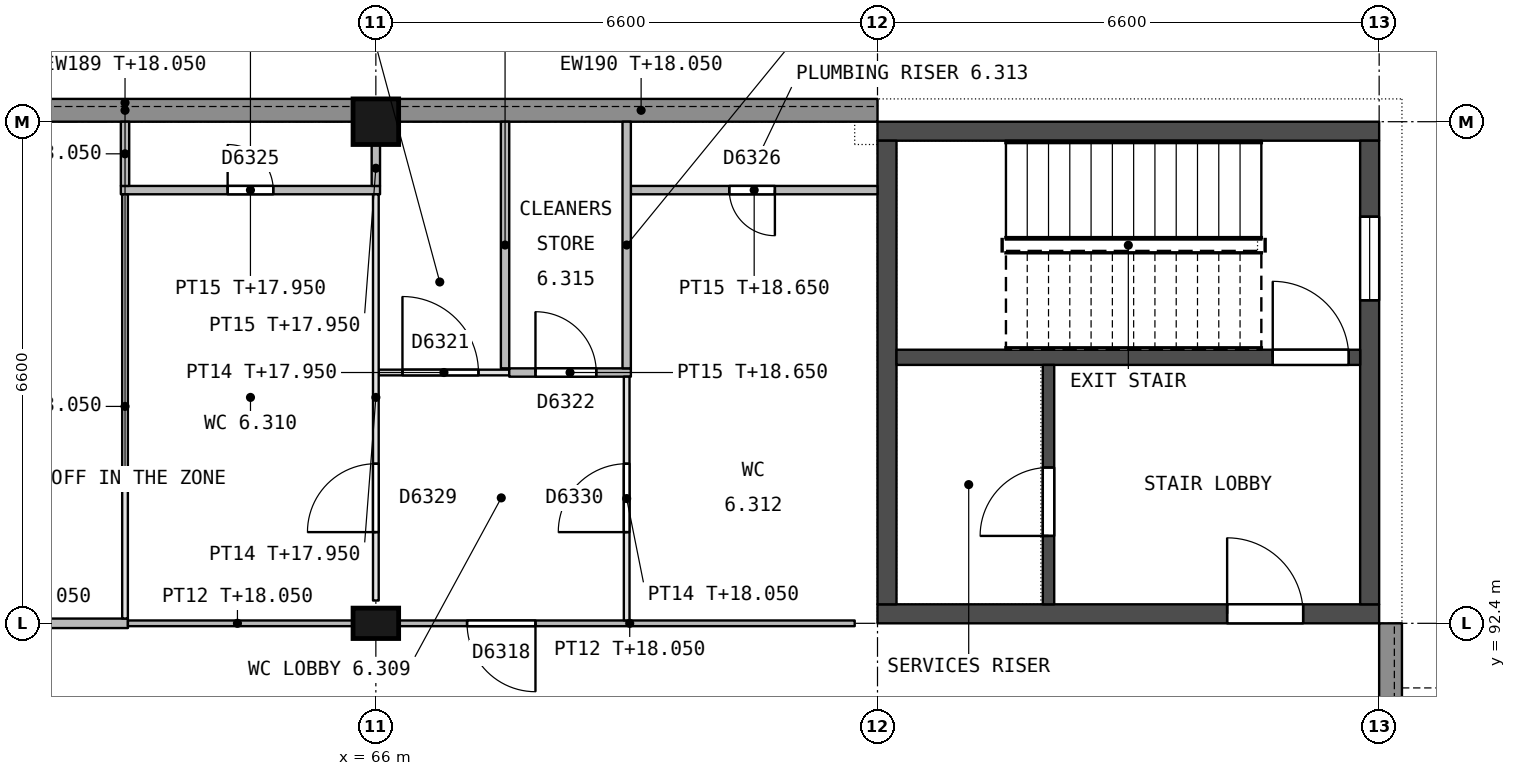
"""IFC4 building model, lengths in metres.
Left out: names, types, materials, properties, quantities, classifications, styles, units other than length and angle.
Written with IfcOpenShell. Run it as: python <this file> out.ifc"""

import sys

from ifc_helpers import new_model, si_unit, direction, frame, frame_2d, origin, origin_2d, place, context, subcontext, project, spatial, rectangle, extrude, element, fill, save


model = new_model("IFC4")
c1 = context("Model", 3, precision=1e-05, world=origin(), true_north=direction((0.0, 1.0)))
c2 = subcontext(c1, "Body", "Model", "MODEL_VIEW")
j1 = project(units=[si_unit("LENGTHUNIT", "METRE"), si_unit("PLANEANGLEUNIT", "RADIAN")], contexts=[c1])
p1 = place(None, origin())
s1 = spatial("IfcSite", under=j1, at=p1, CompositionType="ELEMENT")
p2 = place(p1, origin())
s2 = spatial("IfcBuilding", under=s1, at=p2, CompositionType="ELEMENT")
p3 = place(p2, frame((0.0, 0.0, 14.4)))
s3 = spatial("IfcBuildingStorey", under=s2, at=p3, CompositionType="ELEMENT", Elevation=14.4)
p4 = place(p3, frame((66.0, 92.4, 0.0), z_axis=(0.0, 0.0, 1.0), x_axis=(1.0, 0.0, 0.0)))
e1 = element("IfcColumn", 1, at=p4, inside=s3, PredefinedType="COLUMN", context=c2, shape_type="SweptSolid", body=[
    extrude(rectangle(XDim=0.6, YDim=0.4, at=origin_2d()), origin(), (0.0, 0.0, 1.0), 4.5),
])
p5 = place(p3, frame((66.0, 99.0, 0.0), z_axis=(0.0, 0.0, 1.0), x_axis=(1.0, 0.0, 0.0)))
e2 = element("IfcColumn", 2, at=p5, inside=s3, PredefinedType="COLUMN", context=c2, shape_type="SweptSolid", body=[
    extrude(rectangle(XDim=0.6, YDim=0.6, at=origin_2d()), origin(), (0.0, 0.0, 1.0), 4.5),
])
p6 = place(p3, frame((72.6, 92.525, 0.0), z_axis=(0.0, 0.0, 1.0), x_axis=(1.0, 0.0, 0.0)))
e3 = element("IfcWall", 3, at=p6, inside=s3, PredefinedType="SHEAR", context=c2, shape_type="SweptSolid", body=[
    extrude(rectangle(XDim=6.6, YDim=0.25, at=frame_2d((3.3, 0.0))), origin(), (0.0, 0.0, 1.0), 4.25),
])
p7 = place(p6, frame((4.6, 0.0, 0.0)))
e4 = element("IfcOpeningElement", 4, at=p7, cuts=e3, PredefinedType="OPENING", context=c2, shape_type="SweptSolid", body=[
    extrude(rectangle(XDim=1.0, YDim=2.1, at=frame_2d((0.5, 1.05))), frame((0.0, 0.135, 0.0), z_axis=(0.0, -1.0, 0.0), x_axis=(1.0, 0.0, 0.0)), (0.0, 0.0, 1.0), 0.27),
])
p8 = place(p3, frame((72.6, 98.875, 0.0), z_axis=(0.0, 0.0, 1.0), x_axis=(1.0, 0.0, 0.0)))
e5 = element("IfcWall", 5, at=p8, inside=s3, PredefinedType="SHEAR", context=c2, shape_type="SweptSolid", body=[
    extrude(rectangle(XDim=6.6, YDim=0.25, at=frame_2d((3.3, 0.0))), origin(), (0.0, 0.0, 1.0), 4.25),
])
p9 = place(p3, frame((79.075, 92.65, 0.0), z_axis=(0.0, 0.0, 1.0), x_axis=(0.0, 1.0, 0.0)))
e6 = element("IfcWall", 6, at=p9, inside=s3, PredefinedType="SHEAR", context=c2, shape_type="SweptSolid", body=[
    extrude(rectangle(XDim=6.1, YDim=0.25, at=frame_2d((3.05, 0.0))), origin(), (0.0, 0.0, 1.0), 4.25),
])
p10 = place(p9, frame((4.0, 0.0, 0.7)))
e7 = element("IfcOpeningElement", 7, at=p10, cuts=e6, PredefinedType="OPENING", context=c2, shape_type="SweptSolid", body=[
    extrude(rectangle(XDim=1.1, YDim=1.5, at=frame_2d((0.55, 0.75))), frame((0.0, 0.135, 0.0), z_axis=(0.0, -1.0, 0.0), x_axis=(1.0, 0.0, 0.0)), (0.0, 0.0, 1.0), 0.27),
])
p11 = place(p3, frame((72.725, 92.65, 0.0), z_axis=(0.0, 0.0, 1.0), x_axis=(0.0, 1.0, 0.0)))
e8 = element("IfcWall", 8, at=p11, inside=s3, PredefinedType="SHEAR", context=c2, shape_type="SweptSolid", body=[
    extrude(rectangle(XDim=6.1, YDim=0.25, at=frame_2d((3.05, 0.0))), origin(), (0.0, 0.0, 1.0), 4.25),
])
p12 = place(p3, frame((72.85, 95.9, 0.0), z_axis=(0.0, 0.0, 1.0), x_axis=(1.0, 0.0, 0.0)))
e9 = element("IfcWall", 9, at=p12, inside=s3, PredefinedType="SHEAR", context=c2, shape_type="SweptSolid", body=[
    extrude(rectangle(XDim=6.1, YDim=0.2, at=frame_2d((3.05, 0.0))), origin(), (0.0, 0.0, 1.0), 4.25),
])
p13 = place(p12, frame((4.95, 0.0, 0.0)))
e10 = element("IfcOpeningElement", 10, at=p13, cuts=e9, PredefinedType="OPENING", context=c2, shape_type="SweptSolid", body=[
    extrude(rectangle(XDim=1.0, YDim=2.1, at=frame_2d((0.5, 1.05))), frame((0.0, 0.11, 0.0), z_axis=(0.0, -1.0, 0.0), x_axis=(1.0, 0.0, 0.0)), (0.0, 0.0, 1.0), 0.22),
])
p14 = place(p3, frame((74.85, 92.65, 0.0), z_axis=(0.0, 0.0, 1.0), x_axis=(0.0, 1.0, 0.0)))
e11 = element("IfcWall", 11, at=p14, inside=s3, PredefinedType="SHEAR", context=c2, shape_type="SweptSolid", body=[
    extrude(rectangle(XDim=3.15, YDim=0.15, at=frame_2d((1.575, 0.0))), origin(), (0.0, 0.0, 1.0), 4.25),
])
p15 = place(p14, frame((0.9, 0.0, 0.0)))
e12 = element("IfcOpeningElement", 12, at=p15, cuts=e11, PredefinedType="OPENING", context=c2, shape_type="SweptSolid", body=[
    extrude(rectangle(XDim=0.9, YDim=2.1, at=frame_2d((0.45, 1.05))), frame((0.0, 0.085, 0.0), z_axis=(0.0, -1.0, 0.0), x_axis=(1.0, 0.0, 0.0)), (0.0, 0.0, 1.0), 0.17),
])
p16 = place(p3, frame((79.35, 92.4, 0.0), z_axis=(0.0, 0.0, 1.0), x_axis=(0.0, -1.0, 0.0)))
e13 = element("IfcWall", 13, at=p16, inside=s3, PredefinedType="STANDARD", context=c2, shape_type="SweptSolid", body=[
    extrude(rectangle(XDim=3.1, YDim=0.3, at=frame_2d((1.55, 0.0))), origin(), (0.0, 0.0, 1.0), 3.65),
])
p17 = place(p16, frame((1.05, 0.0, 1.1)))
e14 = element("IfcOpeningElement", 14, at=p17, cuts=e13, PredefinedType="OPENING", context=c2, shape_type="SweptSolid", body=[
    extrude(rectangle(XDim=1.2, YDim=1.2, at=frame_2d((0.6, 0.6))), frame((0.0, 0.16, 0.0), z_axis=(0.0, -1.0, 0.0), x_axis=(1.0, 0.0, 0.0)), (0.0, 0.0, 1.0), 0.32),
])
p18 = place(p3, frame((59.7, 99.15, 0.0), z_axis=(0.0, 0.0, 1.0), x_axis=(1.0, 0.0, 0.0)))
e15 = element("IfcWall", 15, at=p18, inside=s3, PredefinedType="STANDARD", context=c2, shape_type="SweptSolid", body=[
    extrude(rectangle(XDim=6.0, YDim=0.3, at=frame_2d((3.0, 0.0))), origin(), (0.0, 0.0, 1.0), 3.65),
])
p19 = place(p3, frame((66.3, 99.15, 0.0), z_axis=(0.0, 0.0, 1.0), x_axis=(1.0, 0.0, 0.0)))
e16 = element("IfcWall", 16, at=p19, inside=s3, PredefinedType="STANDARD", context=c2, shape_type="SweptSolid", body=[
    extrude(rectangle(XDim=6.3, YDim=0.3, at=frame_2d((3.15, 0.0))), origin(), (0.0, 0.0, 1.0), 3.65),
])
p20 = place(p3, frame((59.7, 92.4, 0.0), z_axis=(0.0, 0.0, 1.0), x_axis=(1.0, 0.0, 0.0)))
e17 = element("IfcWall", 17, at=p20, inside=s3, PredefinedType="PARTITIONING", context=c2, shape_type="SweptSolid", body=[
    extrude(rectangle(XDim=3.038, YDim=0.125, at=frame_2d((1.519, 0.0))), origin(), (0.0, 0.0, 1.0), 3.65),
])
p21 = place(p3, frame((62.738, 92.4, 0.0), z_axis=(0.0, 0.0, 1.0), x_axis=(1.0, 0.0, 0.0)))
e18 = element("IfcWall", 18, at=p21, inside=s3, PredefinedType="PARTITIONING", context=c2, shape_type="SweptSolid", body=[
    extrude(rectangle(XDim=2.962, YDim=0.075, at=frame_2d((1.481, 0.0))), origin(), (0.0, 0.0, 1.0), 3.65),
])
p22 = place(p3, frame((66.3, 92.4, 0.0), z_axis=(0.0, 0.0, 1.0), x_axis=(1.0, 0.0, 0.0)))
e19 = element("IfcWall", 19, at=p22, inside=s3, PredefinedType="PARTITIONING", context=c2, shape_type="SweptSolid", body=[
    extrude(rectangle(XDim=6.0, YDim=0.075, at=frame_2d((3.0, 0.0))), origin(), (0.0, 0.0, 1.0), 3.65),
])
p23 = place(p22, frame((0.9, 0.0, 0.0)))
e20 = element("IfcOpeningElement", 20, at=p23, cuts=e19, PredefinedType="OPENING", context=c2, shape_type="SweptSolid", body=[
    extrude(rectangle(XDim=0.9, YDim=2.1, at=frame_2d((0.45, 1.05))), frame((0.0, 0.047, 0.0), z_axis=(0.0, -1.0, 0.0), x_axis=(1.0, 0.0, 0.0)), (0.0, 0.0, 1.0), 0.095),
])
p24 = place(p3, frame((67.755, 95.7, 0.0), z_axis=(0.0, 0.0, 1.0), x_axis=(-1.0, 0.0, 0.0)))
e21 = element("IfcWall", 21, at=p24, inside=s3, PredefinedType="PARTITIONING", context=c2, shape_type="SweptSolid", body=[
    extrude(rectangle(XDim=1.718, YDim=0.075, at=frame_2d((0.859, 0.0))), origin(), (0.0, 0.0, 1.0), 3.55),
])
p25 = place(p24, frame((0.405, 0.0, 0.0)))
e22 = element("IfcOpeningElement", 22, at=p25, cuts=e21, PredefinedType="OPENING", context=c2, shape_type="SweptSolid", body=[
    extrude(rectangle(XDim=1.0, YDim=2.1, at=frame_2d((0.5, 1.05))), frame((0.0, 0.047, 0.0), z_axis=(0.0, -1.0, 0.0), x_axis=(1.0, 0.0, 0.0)), (0.0, 0.0, 1.0), 0.095),
])
p26 = place(p3, frame((67.755, 95.7, 0.0), z_axis=(0.0, 0.0, 1.0), x_axis=(1.0, 0.0, 0.0)))
e23 = element("IfcWall", 23, at=p26, inside=s3, PredefinedType="PARTITIONING", context=c2, shape_type="SweptSolid", body=[
    extrude(rectangle(XDim=1.6, YDim=0.11, at=frame_2d((0.8, 0.0))), origin(), (0.0, 0.0, 1.0), 4.25),
])
p27 = place(p26, frame((0.345, 0.0, 0.0)))
e24 = element("IfcOpeningElement", 24, at=p27, cuts=e23, PredefinedType="OPENING", context=c2, shape_type="SweptSolid", body=[
    extrude(rectangle(XDim=0.8, YDim=2.1, at=frame_2d((0.4, 1.05))), frame((0.0, 0.065, 0.0), z_axis=(0.0, -1.0, 0.0), x_axis=(1.0, 0.0, 0.0)), (0.0, 0.0, 1.0), 0.13),
])
p28 = place(p3, frame((66.055, 98.1, 0.0), z_axis=(0.0, 0.0, 1.0), x_axis=(-1.0, 0.0, 0.0)))
e25 = element("IfcWall", 25, at=p28, inside=s3, PredefinedType="PARTITIONING", context=c2, shape_type="SweptSolid", body=[
    extrude(rectangle(XDim=3.41, YDim=0.11, at=frame_2d((1.705, 0.0))), origin(), (0.0, 0.0, 1.0), 3.55),
])
p29 = place(p28, frame((1.405, 0.0, 0.0)))
e26 = element("IfcOpeningElement", 26, at=p29, cuts=e25, PredefinedType="OPENING", context=c2, shape_type="SweptSolid", body=[
    extrude(rectangle(XDim=0.6, YDim=2.1, at=frame_2d((0.3, 1.05))), frame((0.0, 0.065, 0.0), z_axis=(0.0, -1.0, 0.0), x_axis=(1.0, 0.0, 0.0)), (0.0, 0.0, 1.0), 0.13),
])
p30 = place(p3, frame((72.6, 98.1, 0.0), z_axis=(0.0, 0.0, 1.0), x_axis=(-1.0, 0.0, 0.0)))
e27 = element("IfcWall", 27, at=p30, inside=s3, PredefinedType="PARTITIONING", context=c2, shape_type="SweptSolid", body=[
    extrude(rectangle(XDim=3.245, YDim=0.11, at=frame_2d((1.623, 0.0))), origin(), (0.0, 0.0, 1.0), 4.25),
])
p31 = place(p30, frame((1.35, 0.0, 0.0)))
e28 = element("IfcOpeningElement", 28, at=p31, cuts=e27, PredefinedType="OPENING", context=c2, shape_type="SweptSolid", body=[
    extrude(rectangle(XDim=0.6, YDim=2.1, at=frame_2d((0.3, 1.05))), frame((0.0, 0.065, 0.0), z_axis=(0.0, -1.0, 0.0), x_axis=(1.0, 0.0, 0.0)), (0.0, 0.0, 1.0), 0.13),
])
p32 = place(p3, frame((62.7, 92.463, 0.0), z_axis=(0.0, 0.0, 1.0), x_axis=(0.0, 1.0, 0.0)))
e29 = element("IfcWall", 29, at=p32, inside=s3, PredefinedType="PARTITIONING", context=c2, shape_type="SweptSolid", body=[
    extrude(rectangle(XDim=5.582, YDim=0.075, at=frame_2d((2.791, 0.0))), origin(), (0.0, 0.0, 1.0), 3.65),
])
p33 = place(p3, frame((62.7, 98.155, 0.0), z_axis=(0.0, 0.0, 1.0), x_axis=(0.0, 1.0, 0.0)))
e30 = element("IfcWall", 30, at=p33, inside=s3, PredefinedType="PARTITIONING", context=c2, shape_type="SweptSolid", body=[
    extrude(rectangle(XDim=0.845, YDim=0.11, at=frame_2d((0.422, 0.0))), origin(), (0.0, 0.0, 1.0), 3.65),
])
p34 = place(p3, frame((66.0, 92.7, 0.0), z_axis=(0.0, 0.0, 1.0), x_axis=(0.0, 1.0, 0.0)))
e31 = element("IfcWall", 31, at=p34, inside=s3, PredefinedType="PARTITIONING", context=c2, shape_type="SweptSolid", body=[
    extrude(rectangle(XDim=5.345, YDim=0.075, at=frame_2d((2.672, 0.0))), origin(), (0.0, 0.0, 1.0), 3.55),
])
p35 = place(p34, frame((0.9, 0.0, 0.0)))
e32 = element("IfcOpeningElement", 32, at=p35, cuts=e31, PredefinedType="OPENING", context=c2, shape_type="SweptSolid", body=[
    extrude(rectangle(XDim=0.9, YDim=2.1, at=frame_2d((0.45, 1.05))), frame((0.0, 0.047, 0.0), z_axis=(0.0, -1.0, 0.0), x_axis=(1.0, 0.0, 0.0)), (0.0, 0.0, 1.0), 0.095),
])
p36 = place(p3, frame((66.0, 98.155, 0.0), z_axis=(0.0, 0.0, 1.0), x_axis=(0.0, 1.0, 0.0)))
e33 = element("IfcWall", 33, at=p36, inside=s3, PredefinedType="PARTITIONING", context=c2, shape_type="SweptSolid", body=[
    extrude(rectangle(XDim=0.545, YDim=0.11, at=frame_2d((0.272, 0.0))), origin(), (0.0, 0.0, 1.0), 3.55),
])
p37 = place(p3, frame((67.7, 95.755, 0.0), z_axis=(0.0, 0.0, 1.0), x_axis=(0.0, 1.0, 0.0)))
e34 = element("IfcWall", 34, at=p37, inside=s3, PredefinedType="PARTITIONING", context=c2, shape_type="SweptSolid", body=[
    extrude(rectangle(XDim=3.245, YDim=0.11, at=frame_2d((1.623, 0.0))), origin(), (0.0, 0.0, 1.0), 3.65),
])
p38 = place(p3, frame((69.3, 95.645, 0.0), z_axis=(0.0, 0.0, 1.0), x_axis=(0.0, -1.0, 0.0)))
e35 = element("IfcWall", 35, at=p38, inside=s3, PredefinedType="PARTITIONING", context=c2, shape_type="SweptSolid", body=[
    extrude(rectangle(XDim=3.207, YDim=0.075, at=frame_2d((1.604, 0.0))), origin(), (0.0, 0.0, 1.0), 3.65),
])
p39 = place(p38, frame((1.145, 0.0, 0.0)))
e36 = element("IfcOpeningElement", 36, at=p39, cuts=e35, PredefinedType="OPENING", context=c2, shape_type="SweptSolid", body=[
    extrude(rectangle(XDim=0.9, YDim=2.1, at=frame_2d((0.45, 1.05))), frame((0.0, 0.047, 0.0), z_axis=(0.0, -1.0, 0.0), x_axis=(1.0, 0.0, 0.0)), (0.0, 0.0, 1.0), 0.095),
])
p40 = place(p3, frame((69.3, 95.755, 0.0), z_axis=(0.0, 0.0, 1.0), x_axis=(0.0, 1.0, 0.0)))
e37 = element("IfcWall", 37, at=p40, inside=s3, PredefinedType="PARTITIONING", context=c2, shape_type="SweptSolid", body=[
    extrude(rectangle(XDim=3.245, YDim=0.11, at=frame_2d((1.623, 0.0))), origin(), (0.0, 0.0, 1.0), 3.65),
])
p41 = place(p15, origin())
e38 = element("IfcDoor", 38, at=p41, inside=s3, OperationType="SINGLE_SWING_LEFT", PredefinedType="DOOR", context=c2, shape_type="SweptSolid", body=[
    extrude(rectangle(XDim=0.9, YDim=2.1, at=frame_2d((0.45, 1.05))), frame((0.0, 0.025, 0.0), z_axis=(0.0, -1.0, 0.0), x_axis=(1.0, 0.0, 0.0)), (0.0, 0.0, 1.0), 0.05),
])
fill(e12, e38)
p42 = place(p7, origin())
e39 = element("IfcDoor", 39, at=p42, inside=s3, OperationType="SINGLE_SWING_LEFT", PredefinedType="DOOR", context=c2, shape_type="SweptSolid", body=[
    extrude(rectangle(XDim=1.0, YDim=2.1, at=frame_2d((0.5, 1.05))), frame((0.0, 0.025, 0.0), z_axis=(0.0, -1.0, 0.0), x_axis=(1.0, 0.0, 0.0)), (0.0, 0.0, 1.0), 0.05),
])
fill(e4, e39)
p43 = place(p13, origin())
e40 = element("IfcDoor", 40, at=p43, inside=s3, OperationType="SINGLE_SWING_LEFT", PredefinedType="DOOR", context=c2, shape_type="SweptSolid", body=[
    extrude(rectangle(XDim=1.0, YDim=2.1, at=frame_2d((0.5, 1.05))), frame((0.0, 0.025, 0.0), z_axis=(0.0, -1.0, 0.0), x_axis=(1.0, 0.0, 0.0)), (0.0, 0.0, 1.0), 0.05),
])
fill(e10, e40)
p44 = place(p10, origin())
e41 = element("IfcWindow", 41, at=p44, inside=s3, PartitioningType="SINGLE_PANEL", PredefinedType="WINDOW", context=c2, shape_type="SweptSolid", body=[
    extrude(rectangle(XDim=1.1, YDim=1.5, at=frame_2d((0.55, 0.75))), frame((0.0, 0.03, 0.0), z_axis=(0.0, -1.0, 0.0), x_axis=(1.0, 0.0, 0.0)), (0.0, 0.0, 1.0), 0.06),
])
fill(e7, e41)
p45 = place(p23, origin())
e42 = element("IfcDoor", 42, at=p45, inside=s3, OperationType="SINGLE_SWING_RIGHT", PredefinedType="DOOR", context=c2, shape_type="SweptSolid", body=[
    extrude(rectangle(XDim=0.9, YDim=2.1, at=frame_2d((0.45, 1.05))), frame((0.0, 0.025, 0.0), z_axis=(0.0, -1.0, 0.0), x_axis=(1.0, 0.0, 0.0)), (0.0, 0.0, 1.0), 0.05),
])
fill(e20, e42)
p46 = place(p25, origin())
e43 = element("IfcDoor", 43, at=p46, inside=s3, OperationType="SINGLE_SWING_RIGHT", PredefinedType="DOOR", context=c2, shape_type="SweptSolid", body=[
    extrude(rectangle(XDim=1.0, YDim=2.1, at=frame_2d((0.5, 1.05))), frame((0.0, 0.025, 0.0), z_axis=(0.0, -1.0, 0.0), x_axis=(1.0, 0.0, 0.0)), (0.0, 0.0, 1.0), 0.05),
])
fill(e22, e43)
p47 = place(p27, origin())
e44 = element("IfcDoor", 44, at=p47, inside=s3, OperationType="SINGLE_SWING_LEFT", PredefinedType="DOOR", context=c2, shape_type="SweptSolid", body=[
    extrude(rectangle(XDim=0.8, YDim=2.1, at=frame_2d((0.4, 1.05))), frame((0.0, 0.025, 0.0), z_axis=(0.0, -1.0, 0.0), x_axis=(1.0, 0.0, 0.0)), (0.0, 0.0, 1.0), 0.05),
])
fill(e24, e44)
p48 = place(p29, origin())
e45 = element("IfcDoor", 45, at=p48, inside=s3, OperationType="SINGLE_SWING_RIGHT", PredefinedType="DOOR", context=c2, shape_type="SweptSolid", body=[
    extrude(rectangle(XDim=0.6, YDim=2.1, at=frame_2d((0.3, 1.05))), frame((0.0, 0.025, 0.0), z_axis=(0.0, -1.0, 0.0), x_axis=(1.0, 0.0, 0.0)), (0.0, 0.0, 1.0), 0.05),
])
fill(e26, e45)
p49 = place(p31, origin())
e46 = element("IfcDoor", 46, at=p49, inside=s3, OperationType="SINGLE_SWING_LEFT", PredefinedType="DOOR", context=c2, shape_type="SweptSolid", body=[
    extrude(rectangle(XDim=0.6, YDim=2.1, at=frame_2d((0.3, 1.05))), frame((0.0, 0.025, 0.0), z_axis=(0.0, -1.0, 0.0), x_axis=(1.0, 0.0, 0.0)), (0.0, 0.0, 1.0), 0.05),
])
fill(e28, e46)
p50 = place(p35, origin())
e47 = element("IfcDoor", 47, at=p50, inside=s3, OperationType="SINGLE_SWING_LEFT", PredefinedType="DOOR", context=c2, shape_type="SweptSolid", body=[
    extrude(rectangle(XDim=0.9, YDim=2.1, at=frame_2d((0.45, 1.05))), frame((0.0, 0.025, 0.0), z_axis=(0.0, -1.0, 0.0), x_axis=(1.0, 0.0, 0.0)), (0.0, 0.0, 1.0), 0.05),
])
fill(e32, e47)
p51 = place(p39, origin())
e48 = element("IfcDoor", 48, at=p51, inside=s3, OperationType="SINGLE_SWING_RIGHT", PredefinedType="DOOR", context=c2, shape_type="SweptSolid", body=[
    extrude(rectangle(XDim=0.9, YDim=2.1, at=frame_2d((0.45, 1.05))), frame((0.0, 0.025, 0.0), z_axis=(0.0, -1.0, 0.0), x_axis=(1.0, 0.0, 0.0)), (0.0, 0.0, 1.0), 0.05),
])
fill(e36, e48)
save(model, sys.argv[1])
